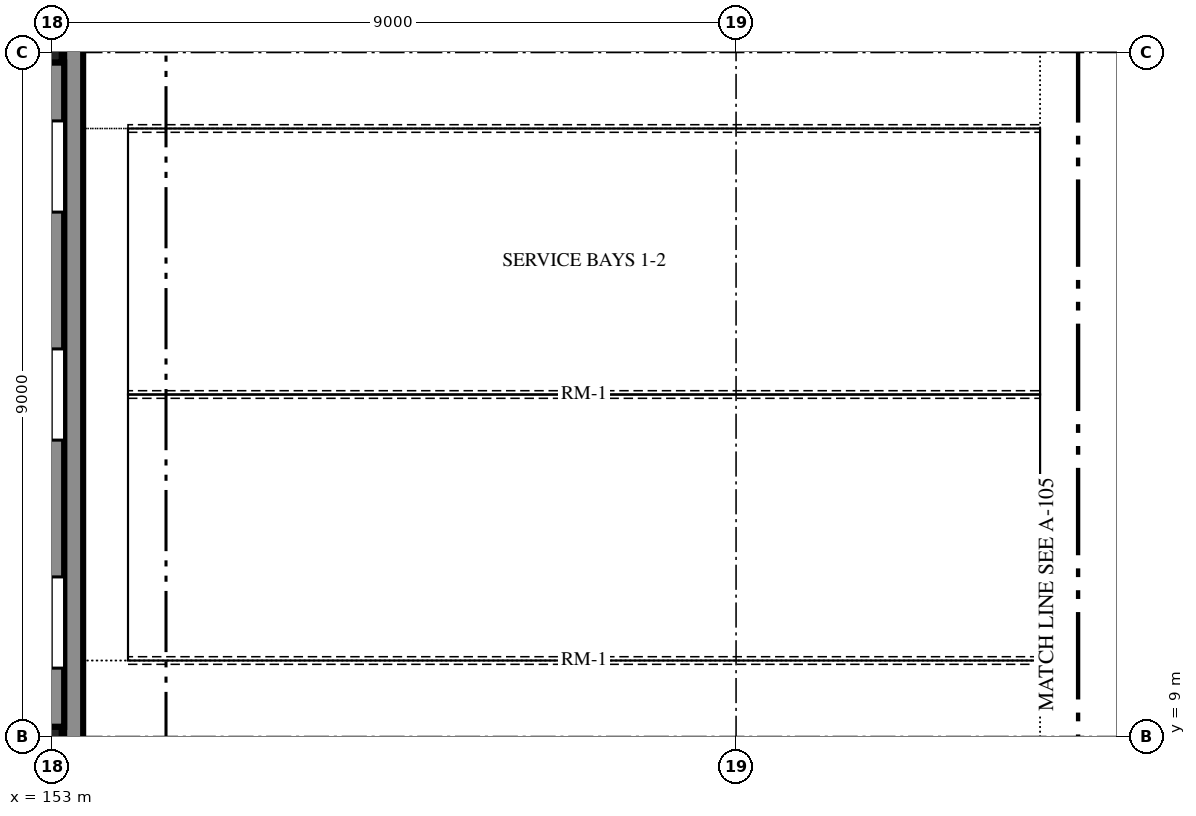
"""IFC4 building model, lengths in metres.
Left out: names, types, materials, properties, quantities, classifications, styles, units other than length and angle.
Written with IfcOpenShell. Run it as: python <this file> out.ifc"""

import sys

from ifc_helpers import new_model, si_unit, direction, frame, frame_2d, origin, origin_2d, place, context, subcontext, project, spatial, polyline, rectangle, i_section, outline, extrude, element, fill, save


model = new_model("IFC4")
c1 = context("Model", 3, precision=1e-05, world=origin(), true_north=direction((0.0, 1.0)))
c2 = subcontext(c1, "Body", "Model", "MODEL_VIEW")
j1 = project(units=[si_unit("LENGTHUNIT", "METRE"), si_unit("PLANEANGLEUNIT", "RADIAN")], contexts=[c1])
p1 = place(None, origin())
s1 = spatial("IfcSite", under=j1, at=p1, CompositionType="ELEMENT")
p2 = place(p1, origin())
s2 = spatial("IfcBuilding", under=s1, at=p2, CompositionType="ELEMENT")
p3 = place(p2, origin())
s3 = spatial("IfcBuildingStorey", under=s2, at=p3, CompositionType="ELEMENT", Elevation=0.0)
p4 = place(p3, frame((153.0, 9.0, -2.1), z_axis=(0.0, 0.0, 1.0), x_axis=(1.0, 0.0, 0.0)))
e1 = element("IfcColumn", 1, at=p4, inside=s3, PredefinedType="COLUMN", context=c2, shape_type="SweptSolid", body=[
    extrude(i_section(OverallWidth=0.255, OverallDepth=0.254, WebThickness=0.009, FlangeThickness=0.014, FilletRadius=0.013, at=origin_2d()), origin(), (0.0, 0.0, 1.0), 9.6),
])
p5 = place(p3, frame((153.0, 18.0, -2.1), z_axis=(0.0, 0.0, 1.0), x_axis=(1.0, 0.0, 0.0)))
e2 = element("IfcColumn", 2, at=p5, inside=s3, PredefinedType="COLUMN", context=c2, shape_type="SweptSolid", body=[
    extrude(i_section(OverallWidth=0.256, OverallDepth=0.26, WebThickness=0.01, FlangeThickness=0.017, FilletRadius=0.013, at=origin_2d()), origin(), (0.0, 0.0, 1.0), 9.6),
])
p6 = place(p3, frame((153.0, 9.127, 0.0), z_axis=(0.0, 0.0, 1.0), x_axis=(0.0, 1.0, 0.0)))
e3 = element("IfcWall", 3, at=p6, inside=s3, PredefinedType="SOLIDWALL", context=c2, shape_type="SweptSolid", body=[
    extrude(rectangle(XDim=8.743, YDim=0.32, at=frame_2d((4.372, 0.0))), origin(), (0.0, 0.0, 1.0), 6.767),
])
p7 = place(p6, frame((0.773, 0.0, 0.9)))
e4 = element("IfcOpeningElement", 4, at=p7, cuts=e3, PredefinedType="OPENING", context=c2, shape_type="SweptSolid", body=[
    extrude(rectangle(XDim=1.2, YDim=2.7, at=frame_2d((0.6, 1.35))), frame((0.0, 0.17, 0.0), z_axis=(0.0, -1.0, 0.0), x_axis=(1.0, 0.0, 0.0)), (0.0, 0.0, 1.0), 0.34),
])
p8 = place(p6, frame((3.773, 0.0, 0.9)))
e5 = element("IfcOpeningElement", 5, at=p8, cuts=e3, PredefinedType="OPENING", context=c2, shape_type="SweptSolid", body=[
    extrude(rectangle(XDim=1.2, YDim=2.7, at=frame_2d((0.6, 1.35))), frame((0.0, 0.17, 0.0), z_axis=(0.0, -1.0, 0.0), x_axis=(1.0, 0.0, 0.0)), (0.0, 0.0, 1.0), 0.34),
])
p9 = place(p6, frame((6.773, 0.0, 0.9)))
e6 = element("IfcOpeningElement", 6, at=p9, cuts=e3, PredefinedType="OPENING", context=c2, shape_type="SweptSolid", body=[
    extrude(rectangle(XDim=1.2, YDim=2.7, at=frame_2d((0.6, 1.35))), frame((0.0, 0.17, 0.0), z_axis=(0.0, -1.0, 0.0), x_axis=(1.0, 0.0, 0.0)), (0.0, 0.0, 1.0), 0.34),
])
p10 = place(p3, frame((153.285, 8.73, 0.0), z_axis=(0.0, 0.0, 1.0), x_axis=(0.0, 1.0, 0.0)))
e7 = element("IfcWall", 7, at=p10, inside=s3, PredefinedType="SOLIDWALL", context=c2, shape_type="SweptSolid", body=[
    extrude(outline(polyline([(0.0, 0.0), (23.22, 0.0), (23.22, 6.767), (0.0, 6.767), (0.0, 0.0)]), holes=[polyline([(1.05, 3.852), (1.17, 4.068), (1.275, 4.122), (1.365, 4.266), (1.56, 4.41), (1.77, 4.5), (1.98, 4.41), (2.175, 4.266), (2.265, 4.122), (2.37, 4.068), (2.49, 3.852), (2.52, 3.6), (2.52, 0.75), (1.02, 0.75), (1.02, 3.6), (1.05, 3.852)]), polyline([(4.17, 4.068), (4.275, 4.122), (4.365, 4.266), (4.56, 4.41), (4.77, 4.5), (4.98, 4.41), (5.175, 4.266), (5.265, 4.122), (5.37, 4.068), (5.49, 3.852), (5.52, 3.6), (5.52, 0.75), (4.02, 0.75), (4.02, 3.6), (4.05, 3.852), (4.17, 4.068)]), polyline([(7.17, 4.068), (7.275, 4.122), (7.365, 4.266), (7.56, 4.41), (7.77, 4.5), (7.98, 4.41), (8.175, 4.266), (8.265, 4.122), (8.37, 4.068), (8.49, 3.852), (8.52, 3.6), (8.52, 0.75), (7.02, 0.75), (7.02, 3.6), (7.05, 3.852), (7.17, 4.068)]), polyline([(10.17, 4.068), (10.275, 4.122), (10.365, 4.266), (10.56, 4.41), (10.77, 4.5), (10.98, 4.41), (11.175, 4.266), (11.265, 4.122), (11.37, 4.068), (11.49, 3.852), (11.52, 3.6), (11.52, 0.75), (10.02, 0.75), (10.02, 3.6), (10.05, 3.852), (10.17, 4.068)]), polyline([(13.17, 4.068), (13.275, 4.122), (13.365, 4.266), (13.56, 4.41), (13.77, 4.5), (13.98, 4.41), (14.175, 4.266), (14.265, 4.122), (14.37, 4.068), (14.49, 3.852), (14.52, 3.6), (14.52, 0.75), (13.02, 0.75), (13.02, 3.6), (13.05, 3.852), (13.17, 4.068)]), polyline([(16.17, 4.068), (16.275, 4.122), (16.365, 4.266), (16.56, 4.41), (16.77, 4.5), (16.98, 4.41), (17.175, 4.266), (17.265, 4.122), (17.37, 4.068), (17.49, 3.852), (17.52, 3.6), (17.52, 0.75), (16.02, 0.75), (16.02, 3.6), (16.05, 3.852), (16.17, 4.068)]), polyline([(19.17, 4.068), (19.275, 4.122), (19.365, 4.266), (19.56, 4.41), (19.77, 4.5), (19.98, 4.41), (20.175, 4.266), (20.265, 4.122), (20.37, 4.068), (20.49, 3.852), (20.52, 3.6), (20.52, 0.75), (19.02, 0.75), (19.02, 3.6), (19.05, 3.852), (19.17, 4.068)])]), frame((0.0, 0.125, 0.0), z_axis=(0.0, -1.0, 0.0), x_axis=(1.0, 0.0, 0.0)), (0.0, 0.0, 1.0), 0.25),
])
p11 = place(p7, origin())
e8 = element("IfcWindow", 8, at=p11, inside=s3, PartitioningType="DOUBLE_PANEL_HORIZONTAL", PredefinedType="WINDOW", context=c2, shape_type="SweptSolid", body=[
    extrude(outline(polyline([(0.0, 0.0), (1.2, 0.0), (1.2, 1.97), (1.195, 2.055), (1.18, 2.139), (1.156, 2.221), (1.123, 2.299), (1.081, 2.374), (1.031, 2.442), (0.973, 2.505), (0.908, 2.561), (0.838, 2.609), (0.762, 2.648), (0.683, 2.679), (0.6, 2.7), (0.517, 2.679), (0.438, 2.648), (0.362, 2.609), (0.292, 2.561), (0.227, 2.505), (0.169, 2.442), (0.119, 2.374), (0.077, 2.299), (0.044, 2.221), (0.02, 2.139), (0.005, 2.055), (0.0, 1.97), (0.0, 0.0)]), holes=[polyline([(0.07, 0.07), (1.13, 0.07), (1.13, 1.97), (1.125, 2.046), (1.113, 2.121), (1.092, 2.194), (1.062, 2.265), (1.025, 2.331), (0.981, 2.393), (0.93, 2.45), (0.873, 2.5), (0.811, 2.544), (0.744, 2.581), (0.673, 2.609), (0.6, 2.63), (0.527, 2.609), (0.456, 2.581), (0.389, 2.544), (0.327, 2.5), (0.27, 2.45), (0.219, 2.393), (0.175, 2.331), (0.138, 2.265), (0.108, 2.194), (0.087, 2.121), (0.074, 2.046), (0.07, 1.97), (0.07, 0.07)])]), frame((0.0, 0.03, 0.0), z_axis=(0.0, -1.0, 0.0), x_axis=(1.0, 0.0, 0.0)), (0.0, 0.0, 1.0), 0.06),
    extrude(outline(polyline([(0.0, 1.97), (0.005, 2.055), (0.02, 2.139), (0.044, 2.221), (0.077, 2.299), (0.119, 2.374), (0.169, 2.442), (0.227, 2.505), (0.292, 2.561), (0.362, 2.609), (0.438, 2.648), (0.517, 2.679), (0.6, 2.7), (0.0, 2.7), (0.0, 1.97)])), frame((0.0, 0.028, 0.0), z_axis=(0.0, -1.0, 0.0), x_axis=(1.0, 0.0, 0.0)), (0.0, 0.0, 1.0), 0.056),
    extrude(outline(polyline([(0.6, 2.7), (0.683, 2.679), (0.762, 2.648), (0.838, 2.609), (0.908, 2.561), (0.973, 2.505), (1.031, 2.442), (1.081, 2.374), (1.123, 2.299), (1.156, 2.221), (1.18, 2.139), (1.195, 2.055), (1.2, 1.97), (1.2, 2.7), (0.6, 2.7)])), frame((0.0, 0.027, 0.0), z_axis=(0.0, -1.0, 0.0), x_axis=(1.0, 0.0, 0.0)), (0.0, 0.0, 1.0), 0.054),
    extrude(outline(polyline([(1.128, 2.01), (0.072, 2.01), (0.07, 1.97), (0.07, 1.93), (1.13, 1.93), (1.13, 1.97), (1.128, 2.01)])), frame((0.0, 0.021, 0.0), z_axis=(0.0, -1.0, 0.0), x_axis=(1.0, 0.0, 0.0)), (0.0, 0.0, 1.0), 0.042),
    extrude(rectangle(XDim=1.06, YDim=0.04, at=frame_2d((0.6, 1.0))), frame((0.0, 0.021, 0.0), z_axis=(0.0, -1.0, 0.0), x_axis=(1.0, 0.0, 0.0)), (0.0, 0.0, 1.0), 0.043),
    extrude(outline(polyline([(0.07, 0.07), (1.13, 0.07), (1.13, 0.98), (0.07, 0.98), (0.07, 0.07)]), holes=[polyline([(0.1, 0.1), (1.1, 0.1), (1.1, 0.95), (0.1, 0.95), (0.1, 0.1)])]), frame((0.0, 0.022, 0.0), z_axis=(0.0, -1.0, 0.0), x_axis=(1.0, 0.0, 0.0)), (0.0, 0.0, 1.0), 0.045),
    extrude(rectangle(XDim=1.0, YDim=0.85, at=frame_2d((0.6, 0.525))), frame((0.0, 0.006, 0.0), z_axis=(0.0, -1.0, 0.0), x_axis=(1.0, 0.0, 0.0)), (0.0, 0.0, 1.0), 0.012),
    extrude(outline(polyline([(0.07, 1.02), (1.13, 1.02), (1.13, 1.93), (0.07, 1.93), (0.07, 1.02)]), holes=[polyline([(0.1, 1.05), (1.1, 1.05), (1.1, 1.9), (0.1, 1.9), (0.1, 1.05)])]), frame((0.0, 0.022, 0.0), z_axis=(0.0, -1.0, 0.0), x_axis=(1.0, 0.0, 0.0)), (0.0, 0.0, 1.0), 0.045),
    extrude(rectangle(XDim=1.0, YDim=0.85, at=frame_2d((0.6, 1.475))), frame((0.0, 0.006, 0.0), z_axis=(0.0, -1.0, 0.0), x_axis=(1.0, 0.0, 0.0)), (0.0, 0.0, 1.0), 0.012),
    extrude(outline(polyline([(0.072, 2.01), (1.128, 2.01), (1.125, 2.046), (1.113, 2.121), (1.092, 2.194), (1.062, 2.265), (1.025, 2.331), (0.981, 2.393), (0.93, 2.45), (0.873, 2.5), (0.811, 2.544), (0.744, 2.581), (0.673, 2.609), (0.6, 2.63), (0.527, 2.609), (0.456, 2.581), (0.389, 2.544), (0.327, 2.5), (0.27, 2.45), (0.219, 2.393), (0.175, 2.331), (0.138, 2.265), (0.108, 2.194), (0.087, 2.121), (0.074, 2.046), (0.072, 2.01)]), holes=[polyline([(0.11, 2.045), (0.121, 2.113), (0.141, 2.183), (0.169, 2.249), (0.204, 2.312), (0.246, 2.371), (0.295, 2.425), (0.349, 2.473), (0.408, 2.514), (0.471, 2.549), (0.538, 2.576), (0.6, 2.594), (0.662, 2.576), (0.729, 2.549), (0.792, 2.514), (0.851, 2.473), (0.905, 2.425), (0.954, 2.371), (0.996, 2.312), (1.031, 2.249), (1.059, 2.183), (1.079, 2.113), (1.09, 2.045), (0.11, 2.045)])]), frame((0.0, 0.022, 0.0), z_axis=(0.0, -1.0, 0.0), x_axis=(1.0, 0.0, 0.0)), (0.0, 0.0, 1.0), 0.045),
    extrude(outline(polyline([(1.09, 2.045), (1.079, 2.113), (1.059, 2.183), (1.031, 2.249), (0.996, 2.312), (0.954, 2.371), (0.905, 2.425), (0.851, 2.473), (0.792, 2.514), (0.729, 2.549), (0.662, 2.576), (0.6, 2.594), (0.538, 2.576), (0.471, 2.549), (0.408, 2.514), (0.349, 2.473), (0.295, 2.425), (0.246, 2.371), (0.204, 2.312), (0.169, 2.249), (0.141, 2.183), (0.121, 2.113), (0.11, 2.045), (1.09, 2.045)])), frame((0.0, 0.006, 0.0), z_axis=(0.0, -1.0, 0.0), x_axis=(1.0, 0.0, 0.0)), (0.0, 0.0, 1.0), 0.012),
])
fill(e4, e8)
p12 = place(p8, origin())
e9 = element("IfcWindow", 9, at=p12, inside=s3, PartitioningType="DOUBLE_PANEL_HORIZONTAL", PredefinedType="WINDOW", context=c2, shape_type="SweptSolid", body=[
    extrude(outline(polyline([(0.0, 0.0), (1.2, 0.0), (1.2, 1.97), (1.195, 2.055), (1.18, 2.139), (1.156, 2.221), (1.123, 2.299), (1.081, 2.374), (1.031, 2.442), (0.973, 2.505), (0.908, 2.561), (0.838, 2.609), (0.762, 2.648), (0.683, 2.679), (0.6, 2.7), (0.517, 2.679), (0.438, 2.648), (0.362, 2.609), (0.292, 2.561), (0.227, 2.505), (0.169, 2.442), (0.119, 2.374), (0.077, 2.299), (0.044, 2.221), (0.02, 2.139), (0.005, 2.055), (0.0, 1.97), (0.0, 0.0)]), holes=[polyline([(0.07, 0.07), (1.13, 0.07), (1.13, 1.97), (1.125, 2.046), (1.113, 2.121), (1.092, 2.194), (1.062, 2.265), (1.025, 2.331), (0.981, 2.393), (0.93, 2.45), (0.873, 2.5), (0.811, 2.544), (0.744, 2.581), (0.673, 2.609), (0.6, 2.63), (0.527, 2.609), (0.456, 2.581), (0.389, 2.544), (0.327, 2.5), (0.27, 2.45), (0.219, 2.393), (0.175, 2.331), (0.138, 2.265), (0.108, 2.194), (0.087, 2.121), (0.074, 2.046), (0.07, 1.97), (0.07, 0.07)])]), frame((0.0, 0.03, 0.0), z_axis=(0.0, -1.0, 0.0), x_axis=(1.0, 0.0, 0.0)), (0.0, 0.0, 1.0), 0.06),
    extrude(outline(polyline([(0.0, 1.97), (0.005, 2.055), (0.02, 2.139), (0.044, 2.221), (0.077, 2.299), (0.119, 2.374), (0.169, 2.442), (0.227, 2.505), (0.292, 2.561), (0.362, 2.609), (0.438, 2.648), (0.517, 2.679), (0.6, 2.7), (0.0, 2.7), (0.0, 1.97)])), frame((0.0, 0.028, 0.0), z_axis=(0.0, -1.0, 0.0), x_axis=(1.0, 0.0, 0.0)), (0.0, 0.0, 1.0), 0.056),
    extrude(outline(polyline([(0.6, 2.7), (0.683, 2.679), (0.762, 2.648), (0.838, 2.609), (0.908, 2.561), (0.973, 2.505), (1.031, 2.442), (1.081, 2.374), (1.123, 2.299), (1.156, 2.221), (1.18, 2.139), (1.195, 2.055), (1.2, 1.97), (1.2, 2.7), (0.6, 2.7)])), frame((0.0, 0.027, 0.0), z_axis=(0.0, -1.0, 0.0), x_axis=(1.0, 0.0, 0.0)), (0.0, 0.0, 1.0), 0.054),
    extrude(outline(polyline([(1.128, 2.01), (0.072, 2.01), (0.07, 1.97), (0.07, 1.93), (1.13, 1.93), (1.13, 1.97), (1.128, 2.01)])), frame((0.0, 0.021, 0.0), z_axis=(0.0, -1.0, 0.0), x_axis=(1.0, 0.0, 0.0)), (0.0, 0.0, 1.0), 0.042),
    extrude(rectangle(XDim=1.06, YDim=0.04, at=frame_2d((0.6, 1.0))), frame((0.0, 0.021, 0.0), z_axis=(0.0, -1.0, 0.0), x_axis=(1.0, 0.0, 0.0)), (0.0, 0.0, 1.0), 0.043),
    extrude(outline(polyline([(0.07, 0.07), (1.13, 0.07), (1.13, 0.98), (0.07, 0.98), (0.07, 0.07)]), holes=[polyline([(0.1, 0.1), (1.1, 0.1), (1.1, 0.95), (0.1, 0.95), (0.1, 0.1)])]), frame((0.0, 0.022, 0.0), z_axis=(0.0, -1.0, 0.0), x_axis=(1.0, 0.0, 0.0)), (0.0, 0.0, 1.0), 0.045),
    extrude(rectangle(XDim=1.0, YDim=0.85, at=frame_2d((0.6, 0.525))), frame((0.0, 0.006, 0.0), z_axis=(0.0, -1.0, 0.0), x_axis=(1.0, 0.0, 0.0)), (0.0, 0.0, 1.0), 0.012),
    extrude(outline(polyline([(0.07, 1.02), (1.13, 1.02), (1.13, 1.93), (0.07, 1.93), (0.07, 1.02)]), holes=[polyline([(0.1, 1.05), (1.1, 1.05), (1.1, 1.9), (0.1, 1.9), (0.1, 1.05)])]), frame((0.0, 0.022, 0.0), z_axis=(0.0, -1.0, 0.0), x_axis=(1.0, 0.0, 0.0)), (0.0, 0.0, 1.0), 0.045),
    extrude(rectangle(XDim=1.0, YDim=0.85, at=frame_2d((0.6, 1.475))), frame((0.0, 0.006, 0.0), z_axis=(0.0, -1.0, 0.0), x_axis=(1.0, 0.0, 0.0)), (0.0, 0.0, 1.0), 0.012),
    extrude(outline(polyline([(0.072, 2.01), (1.128, 2.01), (1.125, 2.046), (1.113, 2.121), (1.092, 2.194), (1.062, 2.265), (1.025, 2.331), (0.981, 2.393), (0.93, 2.45), (0.873, 2.5), (0.811, 2.544), (0.744, 2.581), (0.673, 2.609), (0.6, 2.63), (0.527, 2.609), (0.456, 2.581), (0.389, 2.544), (0.327, 2.5), (0.27, 2.45), (0.219, 2.393), (0.175, 2.331), (0.138, 2.265), (0.108, 2.194), (0.087, 2.121), (0.074, 2.046), (0.072, 2.01)]), holes=[polyline([(0.11, 2.045), (0.121, 2.113), (0.141, 2.183), (0.169, 2.249), (0.204, 2.312), (0.246, 2.371), (0.295, 2.425), (0.349, 2.473), (0.408, 2.514), (0.471, 2.549), (0.538, 2.576), (0.6, 2.594), (0.662, 2.576), (0.729, 2.549), (0.792, 2.514), (0.851, 2.473), (0.905, 2.425), (0.954, 2.371), (0.996, 2.312), (1.031, 2.249), (1.059, 2.183), (1.079, 2.113), (1.09, 2.045), (0.11, 2.045)])]), frame((0.0, 0.022, 0.0), z_axis=(0.0, -1.0, 0.0), x_axis=(1.0, 0.0, 0.0)), (0.0, 0.0, 1.0), 0.045),
    extrude(outline(polyline([(1.09, 2.045), (1.079, 2.113), (1.059, 2.183), (1.031, 2.249), (0.996, 2.312), (0.954, 2.371), (0.905, 2.425), (0.851, 2.473), (0.792, 2.514), (0.729, 2.549), (0.662, 2.576), (0.6, 2.594), (0.538, 2.576), (0.471, 2.549), (0.408, 2.514), (0.349, 2.473), (0.295, 2.425), (0.246, 2.371), (0.204, 2.312), (0.169, 2.249), (0.141, 2.183), (0.121, 2.113), (0.11, 2.045), (1.09, 2.045)])), frame((0.0, 0.006, 0.0), z_axis=(0.0, -1.0, 0.0), x_axis=(1.0, 0.0, 0.0)), (0.0, 0.0, 1.0), 0.012),
])
fill(e5, e9)
p13 = place(p9, origin())
e10 = element("IfcWindow", 10, at=p13, inside=s3, PartitioningType="DOUBLE_PANEL_HORIZONTAL", PredefinedType="WINDOW", context=c2, shape_type="SweptSolid", body=[
    extrude(outline(polyline([(0.0, 0.0), (1.2, 0.0), (1.2, 1.97), (1.195, 2.055), (1.18, 2.139), (1.156, 2.221), (1.123, 2.299), (1.081, 2.374), (1.031, 2.442), (0.973, 2.505), (0.908, 2.561), (0.838, 2.609), (0.762, 2.648), (0.683, 2.679), (0.6, 2.7), (0.517, 2.679), (0.438, 2.648), (0.362, 2.609), (0.292, 2.561), (0.227, 2.505), (0.169, 2.442), (0.119, 2.374), (0.077, 2.299), (0.044, 2.221), (0.02, 2.139), (0.005, 2.055), (0.0, 1.97), (0.0, 0.0)]), holes=[polyline([(0.07, 0.07), (1.13, 0.07), (1.13, 1.97), (1.125, 2.046), (1.113, 2.121), (1.092, 2.194), (1.062, 2.265), (1.025, 2.331), (0.981, 2.393), (0.93, 2.45), (0.873, 2.5), (0.811, 2.544), (0.744, 2.581), (0.673, 2.609), (0.6, 2.63), (0.527, 2.609), (0.456, 2.581), (0.389, 2.544), (0.327, 2.5), (0.27, 2.45), (0.219, 2.393), (0.175, 2.331), (0.138, 2.265), (0.108, 2.194), (0.087, 2.121), (0.074, 2.046), (0.07, 1.97), (0.07, 0.07)])]), frame((0.0, 0.03, 0.0), z_axis=(0.0, -1.0, 0.0), x_axis=(1.0, 0.0, 0.0)), (0.0, 0.0, 1.0), 0.06),
    extrude(outline(polyline([(0.0, 1.97), (0.005, 2.055), (0.02, 2.139), (0.044, 2.221), (0.077, 2.299), (0.119, 2.374), (0.169, 2.442), (0.227, 2.505), (0.292, 2.561), (0.362, 2.609), (0.438, 2.648), (0.517, 2.679), (0.6, 2.7), (0.0, 2.7), (0.0, 1.97)])), frame((0.0, 0.028, 0.0), z_axis=(0.0, -1.0, 0.0), x_axis=(1.0, 0.0, 0.0)), (0.0, 0.0, 1.0), 0.056),
    extrude(outline(polyline([(0.6, 2.7), (0.683, 2.679), (0.762, 2.648), (0.838, 2.609), (0.908, 2.561), (0.973, 2.505), (1.031, 2.442), (1.081, 2.374), (1.123, 2.299), (1.156, 2.221), (1.18, 2.139), (1.195, 2.055), (1.2, 1.97), (1.2, 2.7), (0.6, 2.7)])), frame((0.0, 0.027, 0.0), z_axis=(0.0, -1.0, 0.0), x_axis=(1.0, 0.0, 0.0)), (0.0, 0.0, 1.0), 0.054),
    extrude(outline(polyline([(1.128, 2.01), (0.072, 2.01), (0.07, 1.97), (0.07, 1.93), (1.13, 1.93), (1.13, 1.97), (1.128, 2.01)])), frame((0.0, 0.021, 0.0), z_axis=(0.0, -1.0, 0.0), x_axis=(1.0, 0.0, 0.0)), (0.0, 0.0, 1.0), 0.042),
    extrude(rectangle(XDim=1.06, YDim=0.04, at=frame_2d((0.6, 1.0))), frame((0.0, 0.021, 0.0), z_axis=(0.0, -1.0, 0.0), x_axis=(1.0, 0.0, 0.0)), (0.0, 0.0, 1.0), 0.043),
    extrude(outline(polyline([(0.07, 0.07), (1.13, 0.07), (1.13, 0.98), (0.07, 0.98), (0.07, 0.07)]), holes=[polyline([(0.1, 0.1), (1.1, 0.1), (1.1, 0.95), (0.1, 0.95), (0.1, 0.1)])]), frame((0.0, 0.022, 0.0), z_axis=(0.0, -1.0, 0.0), x_axis=(1.0, 0.0, 0.0)), (0.0, 0.0, 1.0), 0.045),
    extrude(rectangle(XDim=1.0, YDim=0.85, at=frame_2d((0.6, 0.525))), frame((0.0, 0.006, 0.0), z_axis=(0.0, -1.0, 0.0), x_axis=(1.0, 0.0, 0.0)), (0.0, 0.0, 1.0), 0.012),
    extrude(outline(polyline([(0.07, 1.02), (1.13, 1.02), (1.13, 1.93), (0.07, 1.93), (0.07, 1.02)]), holes=[polyline([(0.1, 1.05), (1.1, 1.05), (1.1, 1.9), (0.1, 1.9), (0.1, 1.05)])]), frame((0.0, 0.022, 0.0), z_axis=(0.0, -1.0, 0.0), x_axis=(1.0, 0.0, 0.0)), (0.0, 0.0, 1.0), 0.045),
    extrude(rectangle(XDim=1.0, YDim=0.85, at=frame_2d((0.6, 1.475))), frame((0.0, 0.006, 0.0), z_axis=(0.0, -1.0, 0.0), x_axis=(1.0, 0.0, 0.0)), (0.0, 0.0, 1.0), 0.012),
    extrude(outline(polyline([(0.072, 2.01), (1.128, 2.01), (1.125, 2.046), (1.113, 2.121), (1.092, 2.194), (1.062, 2.265), (1.025, 2.331), (0.981, 2.393), (0.93, 2.45), (0.873, 2.5), (0.811, 2.544), (0.744, 2.581), (0.673, 2.609), (0.6, 2.63), (0.527, 2.609), (0.456, 2.581), (0.389, 2.544), (0.327, 2.5), (0.27, 2.45), (0.219, 2.393), (0.175, 2.331), (0.138, 2.265), (0.108, 2.194), (0.087, 2.121), (0.074, 2.046), (0.072, 2.01)]), holes=[polyline([(0.11, 2.045), (0.121, 2.113), (0.141, 2.183), (0.169, 2.249), (0.204, 2.312), (0.246, 2.371), (0.295, 2.425), (0.349, 2.473), (0.408, 2.514), (0.471, 2.549), (0.538, 2.576), (0.6, 2.594), (0.662, 2.576), (0.729, 2.549), (0.792, 2.514), (0.851, 2.473), (0.905, 2.425), (0.954, 2.371), (0.996, 2.312), (1.031, 2.249), (1.059, 2.183), (1.079, 2.113), (1.09, 2.045), (0.11, 2.045)])]), frame((0.0, 0.022, 0.0), z_axis=(0.0, -1.0, 0.0), x_axis=(1.0, 0.0, 0.0)), (0.0, 0.0, 1.0), 0.045),
    extrude(outline(polyline([(1.09, 2.045), (1.079, 2.113), (1.059, 2.183), (1.031, 2.249), (0.996, 2.312), (0.954, 2.371), (0.905, 2.425), (0.851, 2.473), (0.792, 2.514), (0.729, 2.549), (0.662, 2.576), (0.6, 2.594), (0.538, 2.576), (0.471, 2.549), (0.408, 2.514), (0.349, 2.473), (0.295, 2.425), (0.246, 2.371), (0.204, 2.312), (0.169, 2.249), (0.141, 2.183), (0.121, 2.113), (0.11, 2.045), (1.09, 2.045)])), frame((0.0, 0.006, 0.0), z_axis=(0.0, -1.0, 0.0), x_axis=(1.0, 0.0, 0.0)), (0.0, 0.0, 1.0), 0.012),
])
fill(e6, e10)
save(model, sys.argv[1])
